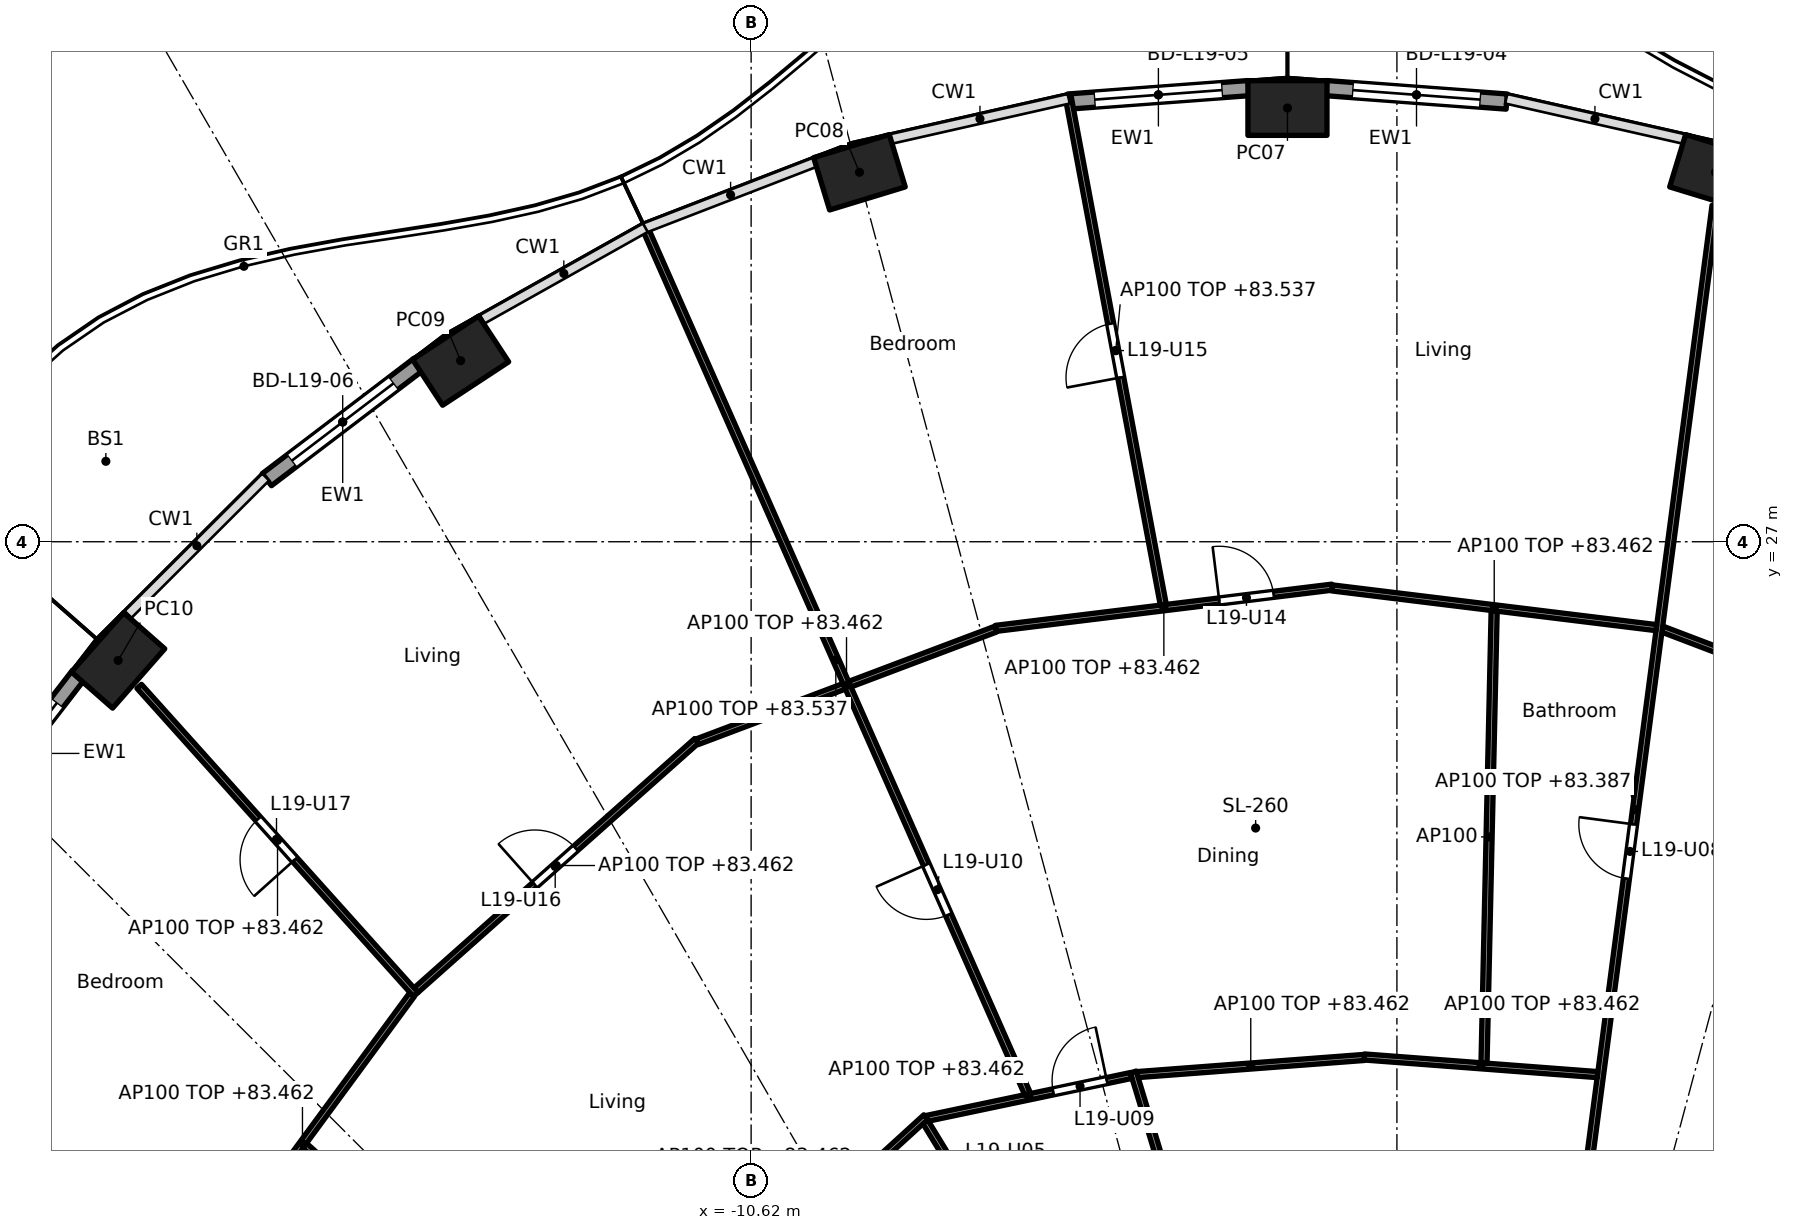
"""IFC4 building model, lengths in metres.
Left out: names, types, materials, properties, quantities, classifications, styles, units other than length and angle.
Written with IfcOpenShell. Run it as: python <this file> out.ifc"""

import sys

from ifc_helpers import new_model, si_unit, direction, frame, frame_2d, origin, origin_2d, place, context, subcontext, project, spatial, rectangle, hollow_rectangle, extrude, element, fill, save


model = new_model("IFC4")
c1 = context("Model", 3, precision=1e-05, world=origin(), true_north=direction((0.0, 1.0)))
c2 = subcontext(c1, "Body", "Model", "MODEL_VIEW")
j1 = project(units=[si_unit("LENGTHUNIT", "METRE"), si_unit("PLANEANGLEUNIT", "RADIAN")], contexts=[c1])
p1 = place(None, origin())
s1 = spatial("IfcSite", under=j1, at=p1, CompositionType="ELEMENT")
p2 = place(p1, origin())
s2 = spatial("IfcBuilding", under=s1, at=p2, CompositionType="ELEMENT")
p3 = place(p2, frame((0.0, 0.0, 80.7)))
s3 = spatial("IfcBuildingStorey", under=s2, at=p3, CompositionType="ELEMENT", Elevation=80.7)
for number, where, z_axis, x_axis in (
    (1, (5.239, 33.076, 0.0), (0.0, 0.0, 1.0), (-0.957, 0.292, 0.0)),
    (2, (-1.8, 34.133, 0.0), (0.0, 0.0, 1.0), (-1.0, 0.0, 0.0)),
    (3, (-8.839, 33.076, 0.0), (0.0, 0.0, 1.0), (-0.957, -0.292, 0.0)),
    (4, (-15.397, 29.978, 0.0), (0.0, 0.0, 1.0), (-0.836, -0.549, 0.0)),
    (5, (-21.03, 25.049, 0.0), (0.0, 0.0, 1.0), (-0.66, -0.751, 0.0)),
):
    element("IfcColumn", number, at=place(p3, frame(where, z_axis=z_axis, x_axis=x_axis)), inside=s3, PredefinedType="COLUMN", context=c2, shape_type="SweptSolid", body=[
        extrude(hollow_rectangle(XDim=1.3, YDim=0.9, WallThickness=0.045, at=origin_2d()), origin(), (0.0, 0.0, 1.0), 3.7),
    ])
p4 = place(p3, frame((-1.161, 34.46, 0.0), z_axis=(0.0, 0.0, 1.0), x_axis=(0.997232262224, -0.074349278273, 0.0)))
e6 = element("IfcWall", 6, at=p4, inside=s3, PredefinedType="SOLIDWALL", context=c2, shape_type="SweptSolid", body=[
    extrude(rectangle(XDim=2.975, YDim=0.25, at=frame_2d((1.488, 0.0))), origin(), (0.0, 0.0, 1.0), 3.44),
])
p5 = place(p4, frame((0.438, 0.0, 0.0)))
e7 = element("IfcOpeningElement", 7, at=p5, cuts=e6, PredefinedType="OPENING", context=c2, shape_type="SweptSolid", body=[
    extrude(rectangle(XDim=2.1, YDim=2.4, at=frame_2d((1.05, 1.2))), frame((0.0, 0.135, 0.0), z_axis=(0.0, -1.0, 0.0), x_axis=(1.0, 0.0, 0.0)), (0.0, 0.0, 1.0), 0.27),
])
p6 = place(p3, frame((-5.406, 34.239, 0.0), z_axis=(0.0, 0.0, 1.0), x_axis=(0.997231808538, 0.074355363224, 0.0)))
e8 = element("IfcWall", 8, at=p6, inside=s3, PredefinedType="SOLIDWALL", context=c2, shape_type="SweptSolid", body=[
    extrude(rectangle(XDim=2.975, YDim=0.25, at=frame_2d((1.487, 0.0))), origin(), (0.0, 0.0, 1.0), 3.44),
])
p7 = place(p6, frame((0.438, 0.0, 0.0)))
e9 = element("IfcOpeningElement", 9, at=p7, cuts=e8, PredefinedType="OPENING", context=c2, shape_type="SweptSolid", body=[
    extrude(rectangle(XDim=2.1, YDim=2.4, at=frame_2d((1.05, 1.2))), frame((0.0, 0.135, 0.0), z_axis=(0.0, -1.0, 0.0), x_axis=(1.0, 0.0, 0.0)), (0.0, 0.0, 1.0), 0.27),
])
p8 = place(p3, frame((-18.584, 28.021, 0.0), z_axis=(0.0, 0.0, 1.0), x_axis=(0.796037575978, 0.605247203736, 0.0)))
e10 = element("IfcWall", 10, at=p8, inside=s3, PredefinedType="SOLIDWALL", context=c2, shape_type="SweptSolid", body=[
    extrude(rectangle(XDim=3.134, YDim=0.25, at=frame_2d((1.567, 0.0))), origin(), (0.0, 0.0, 1.0), 3.44),
])
p9 = place(p8, frame((0.517, 0.0, 0.0)))
e11 = element("IfcOpeningElement", 11, at=p9, cuts=e10, PredefinedType="OPENING", context=c2, shape_type="SweptSolid", body=[
    extrude(rectangle(XDim=2.1, YDim=2.4, at=frame_2d((1.05, 1.2))), frame((0.0, 0.135, 0.0), z_axis=(0.0, -1.0, 0.0), x_axis=(1.0, 0.0, 0.0)), (0.0, 0.0, 1.0), 0.27),
])
p10 = place(p3, frame((-23.673, 22.227, 0.0), z_axis=(0.0, 0.0, 1.0), x_axis=(0.61041202934, 0.792084057684, 0.0)))
e12 = element("IfcWall", 12, at=p10, inside=s3, PredefinedType="SOLIDWALL", context=c2, shape_type="SweptSolid", body=[
    extrude(rectangle(XDim=3.263, YDim=0.25, at=frame_2d((1.631, 0.0))), origin(), (0.0, 0.0, 1.0), 3.44),
])
p11 = place(p10, frame((0.582, 0.0, 0.0)))
e13 = element("IfcOpeningElement", 13, at=p11, cuts=e12, PredefinedType="OPENING", context=c2, shape_type="SweptSolid", body=[
    extrude(rectangle(XDim=2.1, YDim=2.4, at=frame_2d((1.05, 1.2))), frame((0.0, 0.135, 0.0), z_axis=(0.0, -1.0, 0.0), x_axis=(1.0, 0.0, 0.0)), (0.0, 0.0, 1.0), 0.27),
])
p12 = place(p3, frame((9.426, 23.637, 0.0), z_axis=(0.0, 0.0, 1.0), x_axis=(-0.93461405629, 0.355663557011, 0.0)))
e14 = element("IfcWall", 14, at=p12, inside=s3, PredefinedType="PARTITIONING", context=c2, shape_type="SweptSolid", body=[
    extrude(rectangle(XDim=5.417, YDim=0.1, at=frame_2d((2.708, 0.0))), origin(), (0.0, 0.0, 1.0), 2.762),
])
p13 = place(p12, frame((2.258, 0.0, 0.0)))
e15 = element("IfcOpeningElement", 15, at=p13, cuts=e14, PredefinedType="OPENING", context=c2, shape_type="SweptSolid", body=[
    extrude(rectangle(XDim=0.9, YDim=2.1, at=frame_2d((0.45, 1.05))), frame((0.0, 0.06, 0.0), z_axis=(0.0, -1.0, 0.0), x_axis=(1.0, 0.0, 0.0)), (0.0, 0.0, 1.0), 0.12),
])
p14 = place(p3, frame((2.615, 12.664, 0.0), z_axis=(0.0, 0.0, 1.0), x_axis=(0.130614967904, 0.99143316979, 0.0)))
e16 = element("IfcWall", 16, at=p14, inside=s3, PredefinedType="PARTITIONING", context=c2, shape_type="SweptSolid", body=[
    extrude(rectangle(XDim=20.034, YDim=0.1, at=frame_2d((10.017, 0.0))), origin(), (0.0, 0.0, 1.0), 2.687),
])
p15 = place(p14, frame((2.359, 0.0, 0.0)))
e17 = element("IfcOpeningElement", 17, at=p15, cuts=e16, PredefinedType="OPENING", context=c2, shape_type="SweptSolid", body=[
    extrude(rectangle(XDim=0.9, YDim=2.1, at=frame_2d((0.45, 1.05))), frame((0.0, 0.06, 0.0), z_axis=(0.0, -1.0, 0.0), x_axis=(1.0, 0.0, 0.0)), (0.0, 0.0, 1.0), 0.12),
])
p16 = place(p14, frame((8.873, 0.0, 0.0)))
e18 = element("IfcOpeningElement", 18, at=p16, cuts=e16, PredefinedType="OPENING", context=c2, shape_type="SweptSolid", body=[
    extrude(rectangle(XDim=0.9, YDim=2.1, at=frame_2d((0.45, 1.05))), frame((0.0, 0.06, 0.0), z_axis=(0.0, -1.0, 0.0), x_axis=(1.0, 0.0, 0.0)), (0.0, 0.0, 1.0), 0.12),
])
p17 = place(p3, frame((3.299, 18.237, 0.0), z_axis=(0.0, 0.0, 1.0), x_axis=(-0.997152243414, 0.075414875552, 0.0)))
e19 = element("IfcWall", 19, at=p17, inside=s3, PredefinedType="PARTITIONING", context=c2, shape_type="SweptSolid", body=[
    extrude(rectangle(XDim=3.846, YDim=0.1, at=frame_2d((1.923, 0.0))), origin(), (0.0, 0.0, 1.0), 2.762),
])
p18 = place(p3, frame((4.267, 25.587, 0.0), z_axis=(0.0, 0.0, 1.0), x_axis=(-0.992576206119, 0.121624319302, 0.0)))
e20 = element("IfcWall", 20, at=p18, inside=s3, PredefinedType="PARTITIONING", context=c2, shape_type="SweptSolid", body=[
    extrude(rectangle(XDim=5.374, YDim=0.1, at=frame_2d((2.687, 0.0))), origin(), (0.0, 0.0, 1.0), 2.762),
])
p19 = place(p3, frame((1.433, 18.428, 0.0), z_axis=(0.0, 0.0, 1.0), x_axis=(0.022419421812, 0.999748653175, 0.0)))
e21 = element("IfcWall", 21, at=p19, inside=s3, PredefinedType="PARTITIONING", context=c2, shape_type="SweptSolid", body=[
    extrude(rectangle(XDim=7.438, YDim=0.1, at=frame_2d((3.719, 0.0))), origin(), (0.0, 0.0, 1.0), 3.44),
])
p20 = place(p3, frame((-0.536, 18.519, 0.0), z_axis=(0.0, 0.0, 1.0), x_axis=(-0.99715294352, -0.075405618017, 0.0)))
e22 = element("IfcWall", 22, at=p20, inside=s3, PredefinedType="PARTITIONING", context=c2, shape_type="SweptSolid", body=[
    extrude(rectangle(XDim=3.746, YDim=0.1, at=frame_2d((1.873, 0.0))), origin(), (0.0, 0.0, 1.0), 2.762),
])
p21 = place(p3, frame((-1.066, 26.253, 0.0), z_axis=(0.0, 0.0, 1.0), x_axis=(-0.992574197255, -0.121640712523, 0.0)))
e23 = element("IfcWall", 23, at=p21, inside=s3, PredefinedType="PARTITIONING", context=c2, shape_type="SweptSolid", body=[
    extrude(rectangle(XDim=5.574, YDim=0.1, at=frame_2d((2.787, 0.0))), origin(), (0.0, 0.0, 1.0), 2.762),
])
p22 = place(p21, frame((0.969, 0.0, 0.0)))
e24 = element("IfcOpeningElement", 24, at=p22, cuts=e23, PredefinedType="OPENING", context=c2, shape_type="SweptSolid", body=[
    extrude(rectangle(XDim=0.9, YDim=2.1, at=frame_2d((0.45, 1.05))), frame((0.0, 0.06, 0.0), z_axis=(0.0, -1.0, 0.0), x_axis=(1.0, 0.0, 0.0)), (0.0, 0.0, 1.0), 0.12),
])
p23 = place(p3, frame((-3.842, 25.963, 0.0), z_axis=(0.0, 0.0, 1.0), x_axis=(-0.184068442651, 0.982913428752, 0.0)))
e25 = element("IfcWall", 25, at=p23, inside=s3, PredefinedType="PARTITIONING", context=c2, shape_type="SweptSolid", body=[
    extrude(rectangle(XDim=8.506, YDim=0.1, at=frame_2d((4.253, 0.0))), origin(), (0.0, 0.0, 1.0), 2.837),
])
p24 = place(p23, frame((3.803, 0.0, 0.0)))
e26 = element("IfcOpeningElement", 26, at=p24, cuts=e25, PredefinedType="OPENING", context=c2, shape_type="SweptSolid", body=[
    extrude(rectangle(XDim=0.9, YDim=2.1, at=frame_2d((0.45, 1.05))), frame((0.0, 0.06, 0.0), z_axis=(0.0, -1.0, 0.0), x_axis=(1.0, 0.0, 0.0)), (0.0, 0.0, 1.0), 0.12),
])
p25 = place(p3, frame((-2.631, 12.66, 0.0), z_axis=(0.0, 0.0, 1.0), x_axis=(-0.290145836284, 0.956982441682, 0.0)))
e27 = element("IfcWall", 27, at=p25, inside=s3, PredefinedType="PARTITIONING", context=c2, shape_type="SweptSolid", body=[
    extrude(rectangle(XDim=5.873, YDim=0.1, at=frame_2d((2.937, 0.0))), origin(), (0.0, 0.0, 1.0), 2.687),
])
p26 = place(p25, frame((0.772, 0.0, 0.0)))
e28 = element("IfcOpeningElement", 28, at=p26, cuts=e27, PredefinedType="OPENING", context=c2, shape_type="SweptSolid", body=[
    extrude(rectangle(XDim=0.9, YDim=2.1, at=frame_2d((0.45, 1.05))), frame((0.0, 0.06, 0.0), z_axis=(0.0, -1.0, 0.0), x_axis=(1.0, 0.0, 0.0)), (0.0, 0.0, 1.0), 0.12),
])
p27 = place(p3, frame((-4.37, 18.223, 0.0), z_axis=(0.0, 0.0, 1.0), x_axis=(-0.978619056583, -0.205681166112, 0.0)))
e29 = element("IfcWall", 29, at=p27, inside=s3, PredefinedType="PARTITIONING", context=c2, shape_type="SweptSolid", body=[
    extrude(rectangle(XDim=3.438, YDim=0.1, at=frame_2d((1.719, 0.0))), origin(), (0.0, 0.0, 1.0), 2.762),
])
p28 = place(p27, frame((0.409, 0.0, 0.0)))
e30 = element("IfcOpeningElement", 30, at=p28, cuts=e29, PredefinedType="OPENING", context=c2, shape_type="SweptSolid", body=[
    extrude(rectangle(XDim=0.9, YDim=2.1, at=frame_2d((0.45, 1.05))), frame((0.0, 0.06, 0.0), z_axis=(0.0, -1.0, 0.0), x_axis=(1.0, 0.0, 0.0)), (0.0, 0.0, 1.0), 0.12),
])
p29 = place(p3, frame((-6.596, 25.563, 0.0), z_axis=(0.0, 0.0, 1.0), x_axis=(-0.9356162121, -0.353018843201, 0.0)))
e31 = element("IfcWall", 31, at=p29, inside=s3, PredefinedType="PARTITIONING", context=c2, shape_type="SweptSolid", body=[
    extrude(rectangle(XDim=5.249, YDim=0.1, at=frame_2d((2.625, 0.0))), origin(), (0.0, 0.0, 1.0), 2.762),
])
p30 = place(p3, frame((-6.072, 17.915, 0.0), z_axis=(0.0, 0.0, 1.0), x_axis=(-0.404139814253, 0.914697223422, 0.0)))
e32 = element("IfcWall", 32, at=p30, inside=s3, PredefinedType="PARTITIONING", context=c2, shape_type="SweptSolid", body=[
    extrude(rectangle(XDim=15.614, YDim=0.1, at=frame_2d((7.807, 0.0))), origin(), (0.0, 0.0, 1.0), 2.837),
])
p31 = place(p30, frame((3.226, 0.0, 0.0)))
e33 = element("IfcOpeningElement", 33, at=p31, cuts=e32, PredefinedType="OPENING", context=c2, shape_type="SweptSolid", body=[
    extrude(rectangle(XDim=0.9, YDim=2.1, at=frame_2d((0.45, 1.05))), frame((0.0, 0.06, 0.0), z_axis=(0.0, -1.0, 0.0), x_axis=(1.0, 0.0, 0.0)), (0.0, 0.0, 1.0), 0.12),
])
p32 = place(p3, frame((-6.149, 14.825, 0.0), z_axis=(0.0, 0.0, 1.0), x_axis=(-0.520433196839, 0.853902387646, 0.0)))
e34 = element("IfcWall", 34, at=p32, inside=s3, PredefinedType="PARTITIONING", context=c2, shape_type="SweptSolid", body=[
    extrude(rectangle(XDim=3.09, YDim=0.1, at=frame_2d((1.545, 0.0))), origin(), (0.0, 0.0, 1.0), 3.44),
])
p33 = place(p32, frame((1.542, 0.0, 0.0)))
e35 = element("IfcOpeningElement", 35, at=p33, cuts=e34, PredefinedType="OPENING", context=c2, shape_type="SweptSolid", body=[
    extrude(rectangle(XDim=0.9, YDim=2.1, at=frame_2d((0.45, 1.05))), frame((0.0, 0.06, 0.0), z_axis=(0.0, -1.0, 0.0), x_axis=(1.0, 0.0, 0.0)), (0.0, 0.0, 1.0), 0.12),
])
p34 = place(p3, frame((-7.746, 17.539, 0.0), z_axis=(0.0, 0.0, 1.0), x_axis=(-0.738860434967, -0.673858484877, 0.0)))
e36 = element("IfcWall", 36, at=p34, inside=s3, PredefinedType="PARTITIONING", context=c2, shape_type="SweptSolid", body=[
    extrude(rectangle(XDim=4.947, YDim=0.1, at=frame_2d((2.473, 0.0))), origin(), (0.0, 0.0, 1.0), 2.762),
])
p35 = place(p3, frame((-11.516, 23.726, 0.0), z_axis=(0.0, 0.0, 1.0), x_axis=(-0.747428955243, -0.664341747043, 0.0)))
e37 = element("IfcWall", 37, at=p35, inside=s3, PredefinedType="PARTITIONING", context=c2, shape_type="SweptSolid", body=[
    extrude(rectangle(XDim=6.174, YDim=0.1, at=frame_2d((3.087, 0.0))), origin(), (0.0, 0.0, 1.0), 2.762),
])
p36 = place(p35, frame((2.662, 0.0, 0.0)))
e38 = element("IfcOpeningElement", 38, at=p36, cuts=e37, PredefinedType="OPENING", context=c2, shape_type="SweptSolid", body=[
    extrude(rectangle(XDim=0.9, YDim=2.1, at=frame_2d((0.45, 1.05))), frame((0.0, 0.06, 0.0), z_axis=(0.0, -1.0, 0.0), x_axis=(1.0, 0.0, 0.0)), (0.0, 0.0, 1.0), 0.12),
])
p37 = place(p3, frame((-16.134, 19.554, 0.0), z_axis=(0.0, 0.0, 1.0), x_axis=(-0.667985610263, 0.74417418961, 0.0)))
e39 = element("IfcWall", 39, at=p37, inside=s3, PredefinedType="PARTITIONING", context=c2, shape_type="SweptSolid", body=[
    extrude(rectangle(XDim=6.809, YDim=0.1, at=frame_2d((3.405, 0.0))), origin(), (0.0, 0.0, 1.0), 2.762),
])
p38 = place(p37, frame((2.98, 0.0, 0.0)))
e40 = element("IfcOpeningElement", 40, at=p38, cuts=e39, PredefinedType="OPENING", context=c2, shape_type="SweptSolid", body=[
    extrude(rectangle(XDim=0.9, YDim=2.1, at=frame_2d((0.45, 1.05))), frame((0.0, 0.06, 0.0), z_axis=(0.0, -1.0, 0.0), x_axis=(1.0, 0.0, 0.0)), (0.0, 0.0, 1.0), 0.12),
])
p39 = place(p3, frame((-16.197, 19.551, 0.0), z_axis=(0.0, 0.0, 1.0), x_axis=(-0.592391983588, -0.80564988536, 0.0)))
e41 = element("IfcWall", 41, at=p39, inside=s3, PredefinedType="PARTITIONING", context=c2, shape_type="SweptSolid", body=[
    extrude(rectangle(XDim=6.08, YDim=0.1, at=frame_2d((3.04, 0.0))), origin(), (0.0, 0.0, 1.0), 2.762),
])
p40 = place(p3, frame((-8.959, 8.952, 0.0), z_axis=(0.0, 0.0, 1.0), x_axis=(-0.742679904999, 0.669646592398, 0.0)))
e42 = element("IfcWall", 42, at=p40, inside=s3, PredefinedType="PARTITIONING", context=c2, shape_type="SweptSolid", body=[
    extrude(rectangle(XDim=12.121, YDim=0.1, at=frame_2d((6.061, 0.0))), origin(), (0.0, 0.0, 1.0), 2.687),
])
p41 = place(p40, frame((2.172, 0.0, 0.0)))
e43 = element("IfcOpeningElement", 43, at=p41, cuts=e42, PredefinedType="OPENING", context=c2, shape_type="SweptSolid", body=[
    extrude(rectangle(XDim=0.9, YDim=2.1, at=frame_2d((0.45, 1.05))), frame((0.0, 0.06, 0.0), z_axis=(0.0, -1.0, 0.0), x_axis=(1.0, 0.0, 0.0)), (0.0, 0.0, 1.0), 0.12),
])
p42 = place(p40, frame((8.233, 0.0, 0.0)))
e44 = element("IfcOpeningElement", 44, at=p42, cuts=e42, PredefinedType="OPENING", context=c2, shape_type="SweptSolid", body=[
    extrude(rectangle(XDim=0.9, YDim=2.1, at=frame_2d((0.45, 1.05))), frame((0.0, 0.06, 0.0), z_axis=(0.0, -1.0, 0.0), x_axis=(1.0, 0.0, 0.0)), (0.0, 0.0, 1.0), 0.12),
])
p43 = place(p3, frame((-19.788, 14.583, 0.0), z_axis=(0.0, 0.0, 1.0), x_axis=(-0.813175286569, 0.58201885993, 0.0)))
e45 = element("IfcWall", 45, at=p43, inside=s3, PredefinedType="PARTITIONING", context=c2, shape_type="SweptSolid", body=[
    extrude(rectangle(XDim=6.329, YDim=0.1, at=frame_2d((3.164, 0.0))), origin(), (0.0, 0.0, 1.0), 2.762),
])
p44 = place(p5, origin())
e46 = element("IfcDoor", 46, at=p44, inside=s3, OperationType="SLIDING_TO_LEFT", PredefinedType="DOOR", context=c2, shape_type="SweptSolid", body=[
    extrude(rectangle(XDim=2.1, YDim=2.4, at=frame_2d((1.05, 1.2))), frame((0.0, 0.025, 0.0), z_axis=(0.0, -1.0, 0.0), x_axis=(1.0, 0.0, 0.0)), (0.0, 0.0, 1.0), 0.05),
])
fill(e7, e46)
p45 = place(p7, origin())
e47 = element("IfcDoor", 47, at=p45, inside=s3, OperationType="SLIDING_TO_LEFT", PredefinedType="DOOR", context=c2, shape_type="SweptSolid", body=[
    extrude(rectangle(XDim=2.1, YDim=2.4, at=frame_2d((1.05, 1.2))), frame((0.0, 0.025, 0.0), z_axis=(0.0, -1.0, 0.0), x_axis=(1.0, 0.0, 0.0)), (0.0, 0.0, 1.0), 0.05),
])
fill(e9, e47)
p46 = place(p9, origin())
e48 = element("IfcDoor", 48, at=p46, inside=s3, OperationType="SLIDING_TO_LEFT", PredefinedType="DOOR", context=c2, shape_type="SweptSolid", body=[
    extrude(rectangle(XDim=2.1, YDim=2.4, at=frame_2d((1.05, 1.2))), frame((0.0, 0.025, 0.0), z_axis=(0.0, -1.0, 0.0), x_axis=(1.0, 0.0, 0.0)), (0.0, 0.0, 1.0), 0.05),
])
fill(e11, e48)
p47 = place(p11, origin())
e49 = element("IfcDoor", 49, at=p47, inside=s3, OperationType="SLIDING_TO_LEFT", PredefinedType="DOOR", context=c2, shape_type="SweptSolid", body=[
    extrude(rectangle(XDim=2.1, YDim=2.4, at=frame_2d((1.05, 1.2))), frame((0.0, 0.025, 0.0), z_axis=(0.0, -1.0, 0.0), x_axis=(1.0, 0.0, 0.0)), (0.0, 0.0, 1.0), 0.05),
])
fill(e13, e49)
p48 = place(p16, origin())
e50 = element("IfcDoor", 50, at=p48, inside=s3, OperationType="SINGLE_SWING_RIGHT", PredefinedType="DOOR", context=c2, shape_type="SweptSolid", body=[
    extrude(rectangle(XDim=0.9, YDim=2.1, at=frame_2d((0.45, 1.05))), frame((0.0, 0.025, 0.0), z_axis=(0.0, -1.0, 0.0), x_axis=(1.0, 0.0, 0.0)), (0.0, 0.0, 1.0), 0.05),
])
fill(e18, e50)
p49 = place(p28, frame((0.9, 0.0, 0.0), x_axis=(-1.0, 0.0, 0.0)))
e51 = element("IfcDoor", 51, at=p49, inside=s3, OperationType="SINGLE_SWING_RIGHT", PredefinedType="DOOR", context=c2, shape_type="SweptSolid", body=[
    extrude(rectangle(XDim=0.9, YDim=2.1, at=frame_2d((0.45, 1.05))), frame((0.0, 0.025, 0.0), z_axis=(0.0, -1.0, 0.0), x_axis=(1.0, 0.0, 0.0)), (0.0, 0.0, 1.0), 0.05),
])
fill(e30, e51)
p50 = place(p31, origin())
e52 = element("IfcDoor", 52, at=p50, inside=s3, OperationType="SINGLE_SWING_RIGHT", PredefinedType="DOOR", context=c2, shape_type="SweptSolid", body=[
    extrude(rectangle(XDim=0.9, YDim=2.1, at=frame_2d((0.45, 1.05))), frame((0.0, 0.025, 0.0), z_axis=(0.0, -1.0, 0.0), x_axis=(1.0, 0.0, 0.0)), (0.0, 0.0, 1.0), 0.05),
])
fill(e33, e52)
p51 = place(p22, frame((0.9, 0.0, 0.0), x_axis=(-1.0, 0.0, 0.0)))
e53 = element("IfcDoor", 53, at=p51, inside=s3, OperationType="SINGLE_SWING_LEFT", PredefinedType="DOOR", context=c2, shape_type="SweptSolid", body=[
    extrude(rectangle(XDim=0.9, YDim=2.1, at=frame_2d((0.45, 1.05))), frame((0.0, 0.025, 0.0), z_axis=(0.0, -1.0, 0.0), x_axis=(1.0, 0.0, 0.0)), (0.0, 0.0, 1.0), 0.05),
])
fill(e24, e53)
p52 = place(p24, origin())
e54 = element("IfcDoor", 54, at=p52, inside=s3, OperationType="SINGLE_SWING_LEFT", PredefinedType="DOOR", context=c2, shape_type="SweptSolid", body=[
    extrude(rectangle(XDim=0.9, YDim=2.1, at=frame_2d((0.45, 1.05))), frame((0.0, 0.025, 0.0), z_axis=(0.0, -1.0, 0.0), x_axis=(1.0, 0.0, 0.0)), (0.0, 0.0, 1.0), 0.05),
])
fill(e26, e54)
p53 = place(p36, frame((0.9, 0.0, 0.0), x_axis=(-1.0, 0.0, 0.0)))
e55 = element("IfcDoor", 55, at=p53, inside=s3, OperationType="SINGLE_SWING_LEFT", PredefinedType="DOOR", context=c2, shape_type="SweptSolid", body=[
    extrude(rectangle(XDim=0.9, YDim=2.1, at=frame_2d((0.45, 1.05))), frame((0.0, 0.025, 0.0), z_axis=(0.0, -1.0, 0.0), x_axis=(1.0, 0.0, 0.0)), (0.0, 0.0, 1.0), 0.05),
])
fill(e38, e55)
p54 = place(p38, origin())
e56 = element("IfcDoor", 56, at=p54, inside=s3, OperationType="SINGLE_SWING_LEFT", PredefinedType="DOOR", context=c2, shape_type="SweptSolid", body=[
    extrude(rectangle(XDim=0.9, YDim=2.1, at=frame_2d((0.45, 1.05))), frame((0.0, 0.025, 0.0), z_axis=(0.0, -1.0, 0.0), x_axis=(1.0, 0.0, 0.0)), (0.0, 0.0, 1.0), 0.05),
])
fill(e40, e56)
save(model, sys.argv[1])
